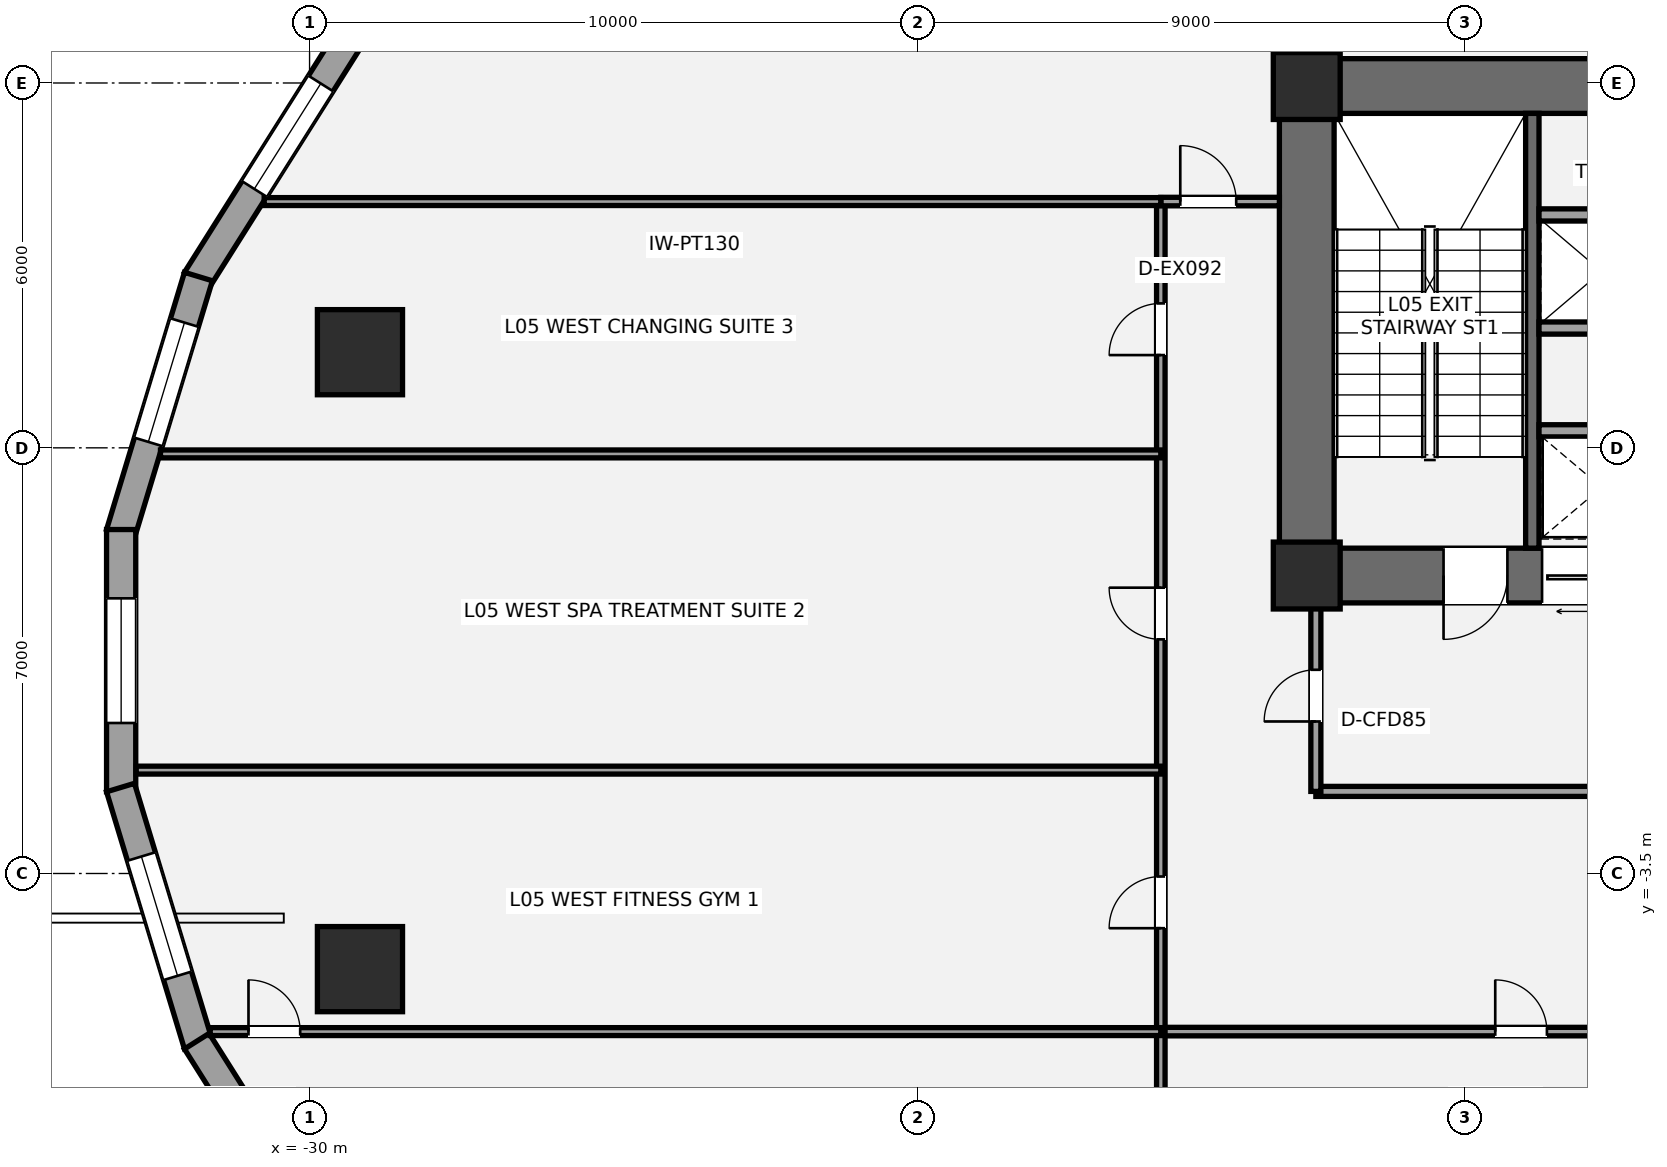
"""IFC4 building model, lengths in metres.
Left out: names, types, materials, properties, quantities, classifications, styles, units other than length and angle.
Written with IfcOpenShell. Run it as: python <this file> out.ifc"""

import sys

from ifc_helpers import new_model, si_unit, direction, frame, frame_2d, origin, origin_2d, place, context, subcontext, project, spatial, rectangle, hollow_circle, extrude, element, fill, save


model = new_model("IFC4")
c1 = context("Model", 3, precision=1e-05, world=origin(), true_north=direction((0.0, 1.0)))
c2 = subcontext(c1, "Body", "Model", "MODEL_VIEW")
j1 = project(units=[si_unit("LENGTHUNIT", "METRE"), si_unit("PLANEANGLEUNIT", "RADIAN")], contexts=[c1])
p1 = place(None, origin())
s1 = spatial("IfcSite", under=j1, at=p1, CompositionType="ELEMENT")
p2 = place(p1, origin())
s2 = spatial("IfcBuilding", under=s1, at=p2, CompositionType="ELEMENT")
p3 = place(p2, frame((0.0, 0.0, 22.8)))
s3 = spatial("IfcBuildingStorey", under=s2, at=p3, CompositionType="ELEMENT", Elevation=22.8)
p4 = place(p3, frame((-13.6, 0.95, 0.0), z_axis=(0.0, 0.0, 1.0), x_axis=(0.0, 1.0, 0.0)))
e1 = element("IfcWall", 1, at=p4, inside=s3, PredefinedType="SHEAR", context=c2, shape_type="SweptSolid", body=[
    extrude(rectangle(XDim=8.95, YDim=0.9, at=frame_2d((4.475, 0.0))), origin(), (0.0, 0.0, 1.0), 4.2),
])
p5 = place(p3, frame((-14.05, 9.45, 0.0), z_axis=(0.0, 0.0, 1.0), x_axis=(1.0, 0.0, 0.0)))
e2 = element("IfcWall", 2, at=p5, inside=s3, PredefinedType="SHEAR", context=c2, shape_type="SweptSolid", body=[
    extrude(rectangle(XDim=9.7, YDim=0.9, at=frame_2d((4.85, 0.0))), origin(), (0.0, 0.0, 1.0), 4.2),
])
p6 = place(p3, frame((-4.75, 1.4, 0.0), z_axis=(0.0, 0.0, 1.0), x_axis=(-1.0, 0.0, 0.0)))
e3 = element("IfcWall", 3, at=p6, inside=s3, PredefinedType="SHEAR", context=c2, shape_type="SweptSolid", body=[
    extrude(rectangle(XDim=9.3, YDim=0.9, at=frame_2d((4.65, 0.0))), origin(), (0.0, 0.0, 1.0), 4.2),
])
p7 = place(p6, frame((5.55, 0.0, 0.0)))
e4 = element("IfcOpeningElement", 4, at=p7, cuts=e3, PredefinedType="OPENING", context=c2, shape_type="SweptSolid", body=[
    extrude(rectangle(XDim=1.05, YDim=2.15, at=frame_2d((0.525, 1.075))), frame((0.0, 0.46, 0.0), z_axis=(0.0, -1.0, 0.0), x_axis=(1.0, 0.0, 0.0)), (0.0, 0.0, 1.0), 0.92),
])
p8 = place(p6, frame((3.88, 0.0, 0.0)))
e5 = element("IfcOpeningElement", 5, at=p8, cuts=e3, PredefinedType="OPENING", context=c2, shape_type="SweptSolid", body=[
    extrude(rectangle(XDim=1.1, YDim=2.2, at=frame_2d((0.55, 1.1))), frame((0.0, 0.46, 0.0), z_axis=(0.0, -1.0, 0.0), x_axis=(1.0, 0.0, 0.0)), (0.0, 0.0, 1.0), 0.92),
])
p9 = place(p3, frame((-9.89, 1.85, 0.0), z_axis=(0.0, 0.0, 1.0), x_axis=(0.0, 1.0, 0.0)))
e6 = element("IfcWall", 6, at=p9, inside=s3, PredefinedType="SHEAR", context=c2, shape_type="SweptSolid", body=[
    extrude(rectangle(XDim=7.15, YDim=0.22, at=frame_2d((3.575, 0.0))), origin(), (0.0, 0.0, 1.0), 4.2),
])
for number, where, z_axis, x_axis in (
    (7, (-13.6, 1.4, 0.0), (0.0, 0.0, 1.0), (1.0, 0.0, 0.0)),
    (8, (-13.6, 9.45, 0.0), (0.0, 0.0, 1.0), (1.0, 0.0, 0.0)),
):
    element("IfcColumn", number, at=place(p3, frame(where, z_axis=z_axis, x_axis=x_axis)), inside=s3, PredefinedType="COLUMN", context=c2, shape_type="SweptSolid", body=[
        extrude(rectangle(XDim=1.1, YDim=1.1, at=origin_2d()), origin(), (0.0, 0.0, 1.0), 4.2),
    ])
for number, where, z_axis, x_axis in (
    (9, (-29.171, 5.073, 0.0), (0.0, 0.0, 1.0), (1.0, 0.0, 0.0)),
    (10, (-29.171, -5.073, 0.0), (0.0, 0.0, 1.0), (1.0, 0.0, 0.0)),
):
    element("IfcColumn", number, at=place(p3, frame(where, z_axis=z_axis, x_axis=x_axis)), inside=s3, PredefinedType="USERDEFINED", context=c2, shape_type="SweptSolid", body=[
        extrude(hollow_circle(Radius=0.7, WallThickness=0.05, at=origin_2d()), origin(), (0.0, 0.0, 1.0), 4.13),
    ])
p10 = place(p3, frame((-31.854, 6.258, 0.0), z_axis=(0.0, 0.0, 1.0), x_axis=(0.53349762721, 0.845801561693, 0.0)))
e11 = element("IfcWall", 11, at=p10, inside=s3, PredefinedType="STANDARD", context=c2, shape_type="SweptSolid", body=[
    extrude(rectangle(XDim=4.711, YDim=0.48, at=frame_2d((2.355, 0.0))), origin(), (0.0, 0.0, 1.0), 3.033),
])
p11 = place(p10, frame((1.773, 0.0, 0.72)))
e12 = element("IfcOpeningElement", 12, at=p11, cuts=e11, PredefinedType="OPENING", context=c2, shape_type="SweptSolid", body=[
    extrude(rectangle(XDim=2.05, YDim=1.8, at=frame_2d((1.025, 0.9))), frame((0.0, 0.25, 0.0), z_axis=(0.0, -1.0, 0.0), x_axis=(1.0, 0.0, 0.0)), (0.0, 0.0, 1.0), 0.5),
])
p12 = place(p3, frame((-33.109, 2.087, 0.0), z_axis=(0.0, 0.0, 1.0), x_axis=(0.289855603468, 0.957070388811, 0.0)))
e13 = element("IfcWall", 13, at=p12, inside=s3, PredefinedType="STANDARD", context=c2, shape_type="SweptSolid", body=[
    extrude(rectangle(XDim=4.419, YDim=0.48, at=frame_2d((2.21, 0.0))), origin(), (0.0, 0.0, 1.0), 3.033),
])
p13 = place(p12, frame((1.579, 0.0, 0.72)))
e14 = element("IfcOpeningElement", 14, at=p13, cuts=e13, PredefinedType="OPENING", context=c2, shape_type="SweptSolid", body=[
    extrude(rectangle(XDim=2.05, YDim=1.8, at=frame_2d((1.025, 0.9))), frame((0.0, 0.25, 0.0), z_axis=(0.0, -1.0, 0.0), x_axis=(1.0, 0.0, 0.0)), (0.0, 0.0, 1.0), 0.5),
])
p14 = place(p3, frame((-33.099, -2.156, 0.0), z_axis=(0.0, 0.0, 1.0), x_axis=(0.0, 1.0, 0.0)))
e15 = element("IfcWall", 15, at=p14, inside=s3, PredefinedType="STANDARD", context=c2, shape_type="SweptSolid", body=[
    extrude(rectangle(XDim=4.313, YDim=0.48, at=frame_2d((2.156, 0.0))), origin(), (0.0, 0.0, 1.0), 3.033),
])
p15 = place(p14, frame((1.131, 0.0, 0.72)))
e16 = element("IfcOpeningElement", 16, at=p15, cuts=e15, PredefinedType="OPENING", context=c2, shape_type="SweptSolid", body=[
    extrude(rectangle(XDim=2.05, YDim=1.8, at=frame_2d((1.025, 0.9))), frame((0.0, 0.25, 0.0), z_axis=(0.0, -1.0, 0.0), x_axis=(1.0, 0.0, 0.0)), (0.0, 0.0, 1.0), 0.5),
])
p16 = place(p3, frame((-31.828, -6.317, 0.0), z_axis=(0.0, 0.0, 1.0), x_axis=(-0.289855603468, 0.957070388811, 0.0)))
e17 = element("IfcWall", 17, at=p16, inside=s3, PredefinedType="STANDARD", context=c2, shape_type="SweptSolid", body=[
    extrude(rectangle(XDim=4.419, YDim=0.48, at=frame_2d((2.21, 0.0))), origin(), (0.0, 0.0, 1.0), 3.033),
])
p17 = place(p16, frame((1.185, 0.0, 0.72)))
e18 = element("IfcOpeningElement", 18, at=p17, cuts=e17, PredefinedType="OPENING", context=c2, shape_type="SweptSolid", body=[
    extrude(rectangle(XDim=2.05, YDim=1.8, at=frame_2d((1.025, 0.9))), frame((0.0, 0.25, 0.0), z_axis=(0.0, -1.0, 0.0), x_axis=(1.0, 0.0, 0.0)), (0.0, 0.0, 1.0), 0.5),
])
p18 = place(p3, frame((-29.341, -10.243, 0.0), z_axis=(0.0, 0.0, 1.0), x_axis=(-0.53349762721, 0.845801561693, 0.0)))
e19 = element("IfcWall", 19, at=p18, inside=s3, PredefinedType="STANDARD", context=c2, shape_type="SweptSolid", body=[
    extrude(rectangle(XDim=4.711, YDim=0.48, at=frame_2d((2.355, 0.0))), origin(), (0.0, 0.0, 1.0), 3.033),
])
p19 = place(p18, frame((1.33, 0.0, 0.72)))
e20 = element("IfcOpeningElement", 20, at=p19, cuts=e19, PredefinedType="OPENING", context=c2, shape_type="SweptSolid", body=[
    extrude(rectangle(XDim=2.05, YDim=1.8, at=frame_2d((1.025, 0.9))), frame((0.0, 0.25, 0.0), z_axis=(0.0, -1.0, 0.0), x_axis=(1.0, 0.0, 0.0)), (0.0, 0.0, 1.0), 0.5),
])
p20 = place(p3, frame((-13.45, -2.15, 0.0), z_axis=(0.0, 0.0, 1.0), x_axis=(1.0, 0.0, 0.0)))
e21 = element("IfcWall", 21, at=p20, inside=s3, PredefinedType="PARTITIONING", context=c2, shape_type="SweptSolid", body=[
    extrude(rectangle(XDim=6.25, YDim=0.165, at=frame_2d((3.125, 0.0))), origin(), (0.0, 0.0, 1.0), 3.9),
])
p21 = place(p3, frame((-13.45, -2.15, 0.0), z_axis=(0.0, 0.0, 1.0), x_axis=(0.0, 1.0, 0.0)))
e22 = element("IfcWall", 22, at=p21, inside=s3, PredefinedType="PARTITIONING", context=c2, shape_type="SweptSolid", body=[
    extrude(rectangle(XDim=3.15, YDim=0.165, at=frame_2d((1.575, 0.0))), origin(), (0.0, 0.0, 1.0), 2.09),
])
p22 = place(p21, frame((1.15, 0.0, 0.0)))
e23 = element("IfcOpeningElement", 23, at=p22, cuts=e22, PredefinedType="OPENING", context=c2, shape_type="SweptSolid", body=[
    extrude(rectangle(XDim=0.85, YDim=2.0, at=frame_2d((0.425, 1.0))), frame((0.0, 0.093, 0.0), z_axis=(0.0, -1.0, 0.0), x_axis=(1.0, 0.0, 0.0)), (0.0, 0.0, 1.0), 0.185),
])
for number, where, z_axis, x_axis in (
    (24, (-9.78, 3.78, 0.0), (0.0, 0.0, 1.0), (1.0, 0.0, 0.0)),
    (25, (-9.78, 5.47, 0.0), (0.0, 0.0, 1.0), (1.0, 0.0, 0.0)),
    (26, (-9.78, 7.33, 0.0), (0.0, 0.0, 1.0), (1.0, 0.0, 0.0)),
):
    element("IfcWall", number, at=place(p3, frame(where, z_axis=z_axis, x_axis=x_axis)), inside=s3, PredefinedType="SOLIDWALL", context=c2, shape_type="SweptSolid", body=[
        extrude(rectangle(XDim=4.13, YDim=0.2, at=frame_2d((2.065, 0.0))), origin(), (0.0, 0.0, 1.0), 3.9),
    ])
p23 = place(p3, frame((-16.0, -6.1, 0.0), z_axis=(0.0, 0.0, 1.0), x_axis=(1.0, 0.0, 0.0)))
e27 = element("IfcWall", 27, at=p23, inside=s3, PredefinedType="PARTITIONING", context=c2, shape_type="SweptSolid", body=[
    extrude(rectangle(XDim=34.4, YDim=0.14, at=frame_2d((17.2, 0.0))), origin(), (0.0, 0.0, 1.0), 2.09),
])
p24 = place(p23, frame((5.5, 0.0, 0.0)))
e28 = element("IfcOpeningElement", 28, at=p24, cuts=e27, PredefinedType="OPENING", context=c2, shape_type="SweptSolid", body=[
    extrude(rectangle(XDim=0.85, YDim=2.0, at=frame_2d((0.425, 1.0))), frame((0.0, 0.08, 0.0), z_axis=(0.0, -1.0, 0.0), x_axis=(1.0, 0.0, 0.0)), (0.0, 0.0, 1.0), 0.16),
])
p25 = place(p23, frame((17.9, 0.0, 0.0)))
e29 = element("IfcOpeningElement", 29, at=p25, cuts=e27, PredefinedType="OPENING", context=c2, shape_type="SweptSolid", body=[
    extrude(rectangle(XDim=0.85, YDim=2.0, at=frame_2d((0.425, 1.0))), frame((0.0, 0.08, 0.0), z_axis=(0.0, -1.0, 0.0), x_axis=(1.0, 0.0, 0.0)), (0.0, 0.0, 1.0), 0.16),
])
p26 = place(p23, frame((28.85, 0.0, 0.0)))
e30 = element("IfcOpeningElement", 30, at=p26, cuts=e27, PredefinedType="OPENING", context=c2, shape_type="SweptSolid", body=[
    extrude(rectangle(XDim=0.85, YDim=2.0, at=frame_2d((0.425, 1.0))), frame((0.0, 0.08, 0.0), z_axis=(0.0, -1.0, 0.0), x_axis=(1.0, 0.0, 0.0)), (0.0, 0.0, 1.0), 0.16),
])
p27 = place(p3, frame((-16.0, -18.778, 0.0), z_axis=(0.0, 0.0, 1.0), x_axis=(0.0, 1.0, 0.0)))
e31 = element("IfcWall", 31, at=p27, inside=s3, PredefinedType="PARTITIONING", context=c2, shape_type="SweptSolid", body=[
    extrude(rectangle(XDim=26.328, YDim=0.14, at=frame_2d((13.164, 0.0))), origin(), (0.0, 0.0, 1.0), 2.09),
])
p28 = place(p27, frame((14.378, 0.0, 0.0)))
e32 = element("IfcOpeningElement", 32, at=p28, cuts=e31, PredefinedType="OPENING", context=c2, shape_type="SweptSolid", body=[
    extrude(rectangle(XDim=0.85, YDim=2.0, at=frame_2d((0.425, 1.0))), frame((0.0, 0.08, 0.0), z_axis=(0.0, -1.0, 0.0), x_axis=(1.0, 0.0, 0.0)), (0.0, 0.0, 1.0), 0.16),
])
p29 = place(p27, frame((19.128, 0.0, 0.0)))
e33 = element("IfcOpeningElement", 33, at=p29, cuts=e31, PredefinedType="OPENING", context=c2, shape_type="SweptSolid", body=[
    extrude(rectangle(XDim=0.85, YDim=2.0, at=frame_2d((0.425, 1.0))), frame((0.0, 0.08, 0.0), z_axis=(0.0, -1.0, 0.0), x_axis=(1.0, 0.0, 0.0)), (0.0, 0.0, 1.0), 0.16),
])
p30 = place(p27, frame((23.803, 0.0, 0.0)))
e34 = element("IfcOpeningElement", 34, at=p30, cuts=e31, PredefinedType="OPENING", context=c2, shape_type="SweptSolid", body=[
    extrude(rectangle(XDim=0.85, YDim=2.0, at=frame_2d((0.425, 1.0))), frame((0.0, 0.08, 0.0), z_axis=(0.0, -1.0, 0.0), x_axis=(1.0, 0.0, 0.0)), (0.0, 0.0, 1.0), 0.16),
])
p31 = place(p3, frame((-16.0, 7.55, 0.0), z_axis=(0.0, 0.0, 1.0), x_axis=(1.0, 0.0, 0.0)))
e35 = element("IfcWall", 35, at=p31, inside=s3, PredefinedType="PARTITIONING", context=c2, shape_type="SweptSolid", body=[
    extrude(rectangle(XDim=1.95, YDim=0.14, at=frame_2d((0.975, 0.0))), origin(), (0.0, 0.0, 1.0), 3.9),
])
p32 = place(p31, frame((0.32, 0.0, 0.0)))
e36 = element("IfcOpeningElement", 36, at=p32, cuts=e35, PredefinedType="OPENING", context=c2, shape_type="SweptSolid", body=[
    extrude(rectangle(XDim=0.92, YDim=2.15, at=frame_2d((0.46, 1.075))), frame((0.0, 0.08, 0.0), z_axis=(0.0, -1.0, 0.0), x_axis=(1.0, 0.0, 0.0)), (0.0, 0.0, 1.0), 0.16),
])
p33 = place(p3, frame((-30.747, 7.55, 0.0), z_axis=(0.0, 0.0, 1.0), x_axis=(1.0, 0.0, 0.0)))
e37 = element("IfcWall", 37, at=p33, inside=s3, PredefinedType="PARTITIONING", context=c2, shape_type="SweptSolid", body=[
    extrude(rectangle(XDim=14.747, YDim=0.13, at=frame_2d((7.373, 0.0))), origin(), (0.0, 0.0, 1.0), 2.09),
])
p34 = place(p3, frame((-31.634, -6.1, 0.0), z_axis=(0.0, 0.0, 1.0), x_axis=(1.0, 0.0, 0.0)))
e38 = element("IfcWall", 38, at=p34, inside=s3, PredefinedType="PARTITIONING", context=c2, shape_type="SweptSolid", body=[
    extrude(rectangle(XDim=15.634, YDim=0.13, at=frame_2d((7.817, 0.0))), origin(), (0.0, 0.0, 1.0), 2.09),
])
p35 = place(p34, frame((0.63, 0.0, 0.0)))
e39 = element("IfcOpeningElement", 39, at=p35, cuts=e38, PredefinedType="OPENING", context=c2, shape_type="SweptSolid", body=[
    extrude(rectangle(XDim=0.85, YDim=2.0, at=frame_2d((0.425, 1.0))), frame((0.0, 0.075, 0.0), z_axis=(0.0, -1.0, 0.0), x_axis=(1.0, 0.0, 0.0)), (0.0, 0.0, 1.0), 0.15),
])
p36 = place(p3, frame((-32.851, -1.8, 0.0), z_axis=(0.0, 0.0, 1.0), x_axis=(1.0, 0.0, 0.0)))
e40 = element("IfcWall", 40, at=p36, inside=s3, PredefinedType="PARTITIONING", context=c2, shape_type="SweptSolid", body=[
    extrude(rectangle(XDim=16.851, YDim=0.13, at=frame_2d((8.425, 0.0))), origin(), (0.0, 0.0, 1.0), 2.09),
])
p37 = place(p3, frame((-32.452, 3.4, 0.0), z_axis=(0.0, 0.0, 1.0), x_axis=(1.0, 0.0, 0.0)))
e41 = element("IfcWall", 41, at=p37, inside=s3, PredefinedType="PARTITIONING", context=c2, shape_type="SweptSolid", body=[
    extrude(rectangle(XDim=16.452, YDim=0.13, at=frame_2d((8.226, 0.0))), origin(), (0.0, 0.0, 1.0), 2.09),
])
p38 = place(p11, origin())
e42 = element("IfcWindow", 42, at=p38, inside=s3, PartitioningType="SINGLE_PANEL", PredefinedType="WINDOW", context=c2, shape_type="SweptSolid", body=[
    extrude(rectangle(XDim=2.05, YDim=1.8, at=frame_2d((1.025, 0.9))), frame((0.0, -0.01, 0.0), z_axis=(0.0, -1.0, 0.0), x_axis=(1.0, 0.0, 0.0)), (0.0, 0.0, 1.0), 0.06),
])
fill(e12, e42)
p39 = place(p13, origin())
e43 = element("IfcWindow", 43, at=p39, inside=s3, PartitioningType="SINGLE_PANEL", PredefinedType="WINDOW", context=c2, shape_type="SweptSolid", body=[
    extrude(rectangle(XDim=2.05, YDim=1.8, at=frame_2d((1.025, 0.9))), frame((0.0, -0.01, 0.0), z_axis=(0.0, -1.0, 0.0), x_axis=(1.0, 0.0, 0.0)), (0.0, 0.0, 1.0), 0.06),
])
fill(e14, e43)
p40 = place(p15, origin())
e44 = element("IfcWindow", 44, at=p40, inside=s3, PartitioningType="SINGLE_PANEL", PredefinedType="WINDOW", context=c2, shape_type="SweptSolid", body=[
    extrude(rectangle(XDim=2.05, YDim=1.8, at=frame_2d((1.025, 0.9))), frame((0.0, -0.01, 0.0), z_axis=(0.0, -1.0, 0.0), x_axis=(1.0, 0.0, 0.0)), (0.0, 0.0, 1.0), 0.06),
])
fill(e16, e44)
p41 = place(p17, origin())
e45 = element("IfcWindow", 45, at=p41, inside=s3, PartitioningType="SINGLE_PANEL", PredefinedType="WINDOW", context=c2, shape_type="SweptSolid", body=[
    extrude(rectangle(XDim=2.05, YDim=1.8, at=frame_2d((1.025, 0.9))), frame((0.0, -0.01, 0.0), z_axis=(0.0, -1.0, 0.0), x_axis=(1.0, 0.0, 0.0)), (0.0, 0.0, 1.0), 0.06),
])
fill(e18, e45)
p42 = place(p7, origin())
e46 = element("IfcDoor", 46, at=p42, inside=s3, OperationType="SINGLE_SWING_RIGHT", PredefinedType="DOOR", context=c2, shape_type="SweptSolid", body=[
    extrude(rectangle(XDim=1.05, YDim=2.15, at=frame_2d((0.525, 1.075))), frame((0.0, 0.025, 0.0), z_axis=(0.0, -1.0, 0.0), x_axis=(1.0, 0.0, 0.0)), (0.0, 0.0, 1.0), 0.05),
])
fill(e4, e46)
p43 = place(p22, origin())
e47 = element("IfcDoor", 47, at=p43, inside=s3, OperationType="SINGLE_SWING_LEFT", PredefinedType="DOOR", context=c2, shape_type="SweptSolid", body=[
    extrude(rectangle(XDim=0.85, YDim=2.0, at=frame_2d((0.425, 1.0))), frame((0.0, 0.025, 0.0), z_axis=(0.0, -1.0, 0.0), x_axis=(1.0, 0.0, 0.0)), (0.0, 0.0, 1.0), 0.05),
])
fill(e23, e47)
p44 = place(p8, origin())
e48 = element("IfcDoor", 48, at=p44, inside=s3, OperationType="SLIDING_TO_LEFT", PredefinedType="DOOR", context=c2, shape_type="SweptSolid", body=[
    extrude(rectangle(XDim=1.1, YDim=2.2, at=frame_2d((0.55, 1.1))), frame((0.0, 0.025, 0.0), z_axis=(0.0, -1.0, 0.0), x_axis=(1.0, 0.0, 0.0)), (0.0, 0.0, 1.0), 0.05),
])
fill(e5, e48)
p45 = place(p24, origin())
e49 = element("IfcDoor", 49, at=p45, inside=s3, OperationType="SINGLE_SWING_LEFT", PredefinedType="DOOR", context=c2, shape_type="SweptSolid", body=[
    extrude(rectangle(XDim=0.85, YDim=2.0, at=frame_2d((0.425, 1.0))), frame((0.0, 0.025, 0.0), z_axis=(0.0, -1.0, 0.0), x_axis=(1.0, 0.0, 0.0)), (0.0, 0.0, 1.0), 0.05),
])
fill(e28, e49)
p46 = place(p32, origin())
e50 = element("IfcDoor", 50, at=p46, inside=s3, OperationType="SINGLE_SWING_LEFT", PredefinedType="DOOR", context=c2, shape_type="SweptSolid", body=[
    extrude(rectangle(XDim=0.92, YDim=2.15, at=frame_2d((0.46, 1.075))), frame((0.0, 0.025, 0.0), z_axis=(0.0, -1.0, 0.0), x_axis=(1.0, 0.0, 0.0)), (0.0, 0.0, 1.0), 0.05),
])
fill(e36, e50)
p47 = place(p35, origin())
e51 = element("IfcDoor", 51, at=p47, inside=s3, OperationType="SINGLE_SWING_LEFT", PredefinedType="DOOR", context=c2, shape_type="SweptSolid", body=[
    extrude(rectangle(XDim=0.85, YDim=2.0, at=frame_2d((0.425, 1.0))), frame((0.0, 0.025, 0.0), z_axis=(0.0, -1.0, 0.0), x_axis=(1.0, 0.0, 0.0)), (0.0, 0.0, 1.0), 0.05),
])
fill(e39, e51)
p48 = place(p28, origin())
e52 = element("IfcDoor", 52, at=p48, inside=s3, OperationType="SINGLE_SWING_LEFT", PredefinedType="DOOR", context=c2, shape_type="SweptSolid", body=[
    extrude(rectangle(XDim=0.85, YDim=2.0, at=frame_2d((0.425, 1.0))), frame((0.0, 0.025, 0.0), z_axis=(0.0, -1.0, 0.0), x_axis=(1.0, 0.0, 0.0)), (0.0, 0.0, 1.0), 0.05),
])
fill(e32, e52)
p49 = place(p29, origin())
e53 = element("IfcDoor", 53, at=p49, inside=s3, OperationType="SINGLE_SWING_RIGHT", PredefinedType="DOOR", context=c2, shape_type="SweptSolid", body=[
    extrude(rectangle(XDim=0.85, YDim=2.0, at=frame_2d((0.425, 1.0))), frame((0.0, 0.025, 0.0), z_axis=(0.0, -1.0, 0.0), x_axis=(1.0, 0.0, 0.0)), (0.0, 0.0, 1.0), 0.05),
])
fill(e33, e53)
p50 = place(p30, origin())
e54 = element("IfcDoor", 54, at=p50, inside=s3, OperationType="SINGLE_SWING_LEFT", PredefinedType="DOOR", context=c2, shape_type="SweptSolid", body=[
    extrude(rectangle(XDim=0.85, YDim=2.0, at=frame_2d((0.425, 1.0))), frame((0.0, 0.025, 0.0), z_axis=(0.0, -1.0, 0.0), x_axis=(1.0, 0.0, 0.0)), (0.0, 0.0, 1.0), 0.05),
])
fill(e34, e54)
save(model, sys.argv[1])
